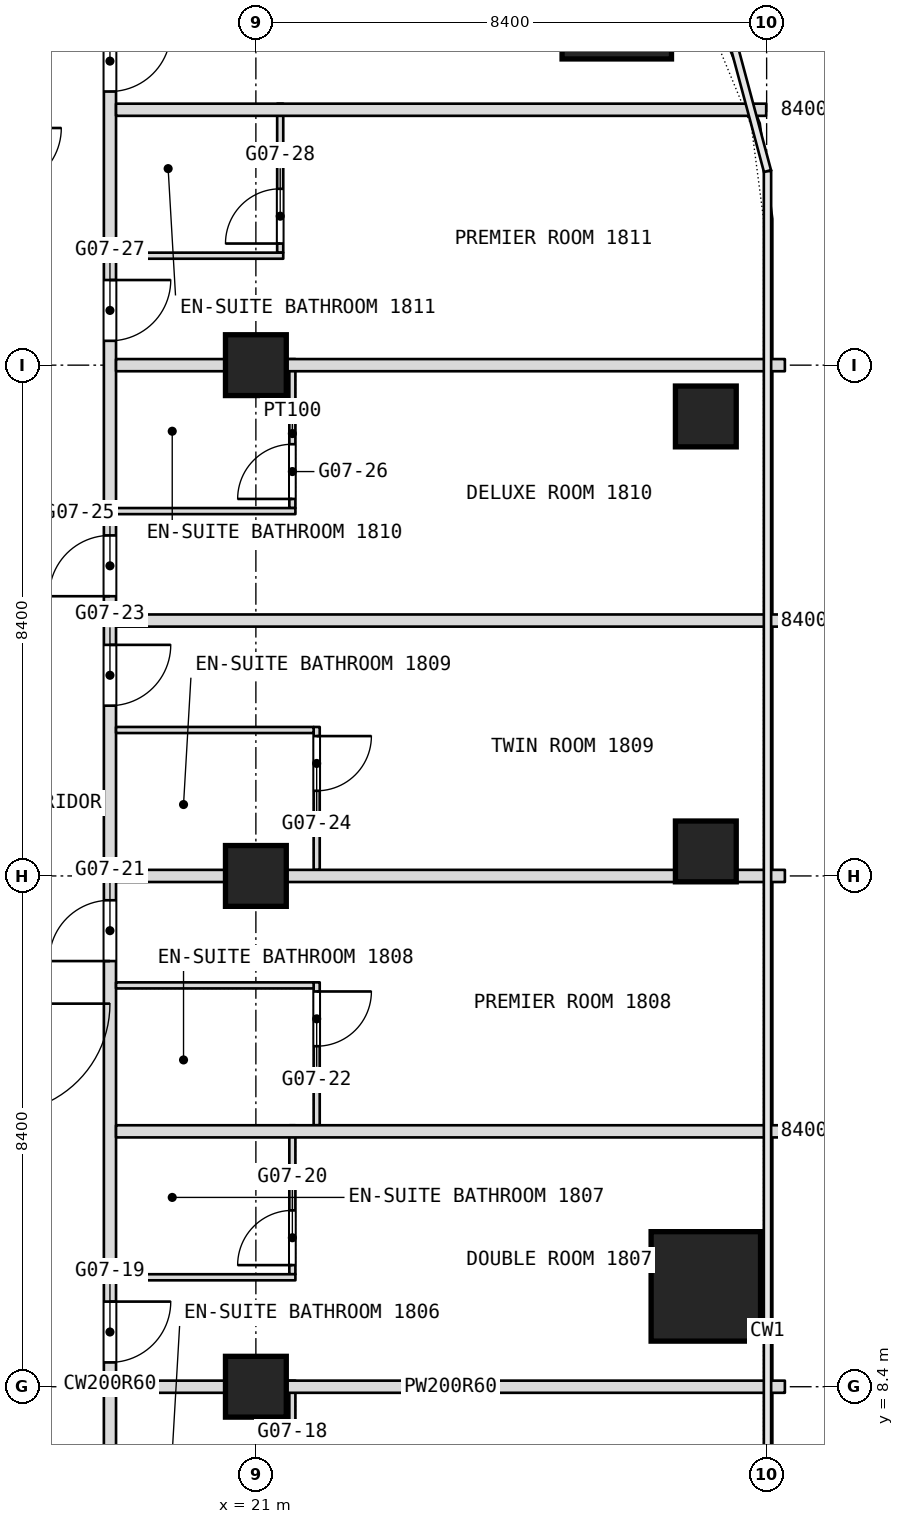
"""IFC4 building model, lengths in metres.
Left out: names, types, materials, properties, quantities, classifications, styles, units other than length and angle.
Written with IfcOpenShell. Run it as: python <this file> out.ifc"""

import sys

from ifc_helpers import new_model, si_unit, direction, frame, frame_2d, origin, origin_2d, place, context, subcontext, project, spatial, rectangle, extrude, element, fill, save


model = new_model("IFC4")
c1 = context("Model", 3, precision=1e-05, world=origin(), true_north=direction((0.0, 1.0)))
c2 = subcontext(c1, "Body", "Model", "MODEL_VIEW")
j1 = project(units=[si_unit("LENGTHUNIT", "METRE"), si_unit("PLANEANGLEUNIT", "RADIAN")], contexts=[c1])
p1 = place(None, origin())
s1 = spatial("IfcSite", under=j1, at=p1, CompositionType="ELEMENT")
p2 = place(p1, origin())
s2 = spatial("IfcBuilding", under=s1, at=p2, CompositionType="ELEMENT")
p3 = place(p2, frame((0.0, 0.0, 79.7)))
s3 = spatial("IfcBuildingStorey", under=s2, at=p3, CompositionType="ELEMENT", Elevation=79.7)
for number, where, z_axis, x_axis in (
    (1, (28.4, 10.05, 0.0), (0.0, 0.0, 1.0), (1.0, 0.0, 0.0)),
    (2, (26.936, 31.135, 0.0), (0.0, 0.0, 1.0), (1.0, 0.0, 0.0)),
):
    element("IfcColumn", number, at=place(p3, frame(where, z_axis=z_axis, x_axis=x_axis)), inside=s3, PredefinedType="COLUMN", context=c2, shape_type="SweptSolid", body=[
        extrude(rectangle(XDim=1.8, YDim=1.8, at=origin_2d()), origin(), (0.0, 0.0, 1.0), 3.6),
    ])
for number, where, z_axis, x_axis in (
    (3, (21.0, 8.4, 0.0), (0.0, 0.0, 1.0), (1.0, 0.0, 0.0)),
    (4, (21.0, 16.8, 0.0), (0.0, 0.0, 1.0), (1.0, 0.0, 0.0)),
    (5, (21.0, 25.2, 0.0), (0.0, 0.0, 1.0), (1.0, 0.0, 0.0)),
    (6, (28.4, 24.356, 0.0), (0.0, 0.0, 1.0), (1.0, 0.0, 0.0)),
    (7, (28.4, 17.203, 0.0), (0.0, 0.0, 1.0), (1.0, 0.0, 0.0)),
):
    element("IfcColumn", number, at=place(p3, frame(where, z_axis=z_axis, x_axis=x_axis)), inside=s3, PredefinedType="COLUMN", context=c2, shape_type="SweptSolid", body=[
        extrude(rectangle(XDim=1.0, YDim=1.0, at=origin_2d()), origin(), (0.0, 0.0, 1.0), 3.6),
    ])
p4 = place(p3, frame((22.0, 12.7, 0.0), z_axis=(0.0, 0.0, 1.0), x_axis=(0.0, 1.0, 0.0)))
e8 = element("IfcWall", 8, at=p4, inside=s3, PredefinedType="PARTITIONING", context=c2, shape_type="SweptSolid", body=[
    extrude(rectangle(XDim=2.35, YDim=0.1, at=frame_2d((1.175, 0.0))), origin(), (0.0, 0.0, 1.0), 3.34),
])
p5 = place(p4, frame((1.3, 0.0, 0.0)))
e9 = element("IfcOpeningElement", 9, at=p5, cuts=e8, PredefinedType="OPENING", context=c2, shape_type="SweptSolid", body=[
    extrude(rectangle(XDim=0.9, YDim=2.1, at=frame_2d((0.45, 1.05))), frame((0.0, 0.05, 0.0), z_axis=(0.0, -1.0, 0.0), x_axis=(1.0, 0.0, 0.0)), (0.0, 0.0, 1.0), 0.1),
])
p6 = place(p3, frame((22.0, 16.9, 0.0), z_axis=(0.0, 0.0, 1.0), x_axis=(0.0, 1.0, 0.0)))
e10 = element("IfcWall", 10, at=p6, inside=s3, PredefinedType="PARTITIONING", context=c2, shape_type="SweptSolid", body=[
    extrude(rectangle(XDim=2.35, YDim=0.1, at=frame_2d((1.175, 0.0))), origin(), (0.0, 0.0, 1.0), 3.34),
])
p7 = place(p6, frame((1.3, 0.0, 0.0)))
e11 = element("IfcOpeningElement", 11, at=p7, cuts=e10, PredefinedType="OPENING", context=c2, shape_type="SweptSolid", body=[
    extrude(rectangle(XDim=0.9, YDim=2.1, at=frame_2d((0.45, 1.05))), frame((0.0, 0.05, 0.0), z_axis=(0.0, -1.0, 0.0), x_axis=(1.0, 0.0, 0.0)), (0.0, 0.0, 1.0), 0.1),
])
p8 = place(p3, frame((21.6, 6.05, 0.0), z_axis=(0.0, 0.0, 1.0), x_axis=(0.0, 1.0, 0.0)))
e12 = element("IfcWall", 12, at=p8, inside=s3, PredefinedType="PARTITIONING", context=c2, shape_type="SweptSolid", body=[
    extrude(rectangle(XDim=2.45, YDim=0.1, at=frame_2d((1.225, 0.0))), origin(), (0.0, 0.0, 1.0), 3.34),
])
p9 = place(p8, frame((0.15, 0.0, 0.0)))
e13 = element("IfcOpeningElement", 13, at=p9, cuts=e12, PredefinedType="OPENING", context=c2, shape_type="SweptSolid", body=[
    extrude(rectangle(XDim=0.9, YDim=2.1, at=frame_2d((0.45, 1.05))), frame((0.0, 0.05, 0.0), z_axis=(0.0, -1.0, 0.0), x_axis=(1.0, 0.0, 0.0)), (0.0, 0.0, 1.0), 0.1),
])
p10 = place(p3, frame((21.6, 10.25, 0.0), z_axis=(0.0, 0.0, 1.0), x_axis=(0.0, 1.0, 0.0)))
e14 = element("IfcWall", 14, at=p10, inside=s3, PredefinedType="PARTITIONING", context=c2, shape_type="SweptSolid", body=[
    extrude(rectangle(XDim=2.45, YDim=0.1, at=frame_2d((1.225, 0.0))), origin(), (0.0, 0.0, 1.0), 3.34),
])
p11 = place(p10, frame((0.15, 0.0, 0.0)))
e15 = element("IfcOpeningElement", 15, at=p11, cuts=e14, PredefinedType="OPENING", context=c2, shape_type="SweptSolid", body=[
    extrude(rectangle(XDim=0.9, YDim=2.1, at=frame_2d((0.45, 1.05))), frame((0.0, 0.05, 0.0), z_axis=(0.0, -1.0, 0.0), x_axis=(1.0, 0.0, 0.0)), (0.0, 0.0, 1.0), 0.1),
])
p12 = place(p3, frame((21.6, 22.85, 0.0), z_axis=(0.0, 0.0, 1.0), x_axis=(0.0, 1.0, 0.0)))
e16 = element("IfcWall", 16, at=p12, inside=s3, PredefinedType="PARTITIONING", context=c2, shape_type="SweptSolid", body=[
    extrude(rectangle(XDim=2.45, YDim=0.1, at=frame_2d((1.225, 0.0))), origin(), (0.0, 0.0, 1.0), 3.34),
])
p13 = place(p12, frame((0.15, 0.0, 0.0)))
e17 = element("IfcOpeningElement", 17, at=p13, cuts=e16, PredefinedType="OPENING", context=c2, shape_type="SweptSolid", body=[
    extrude(rectangle(XDim=0.9, YDim=2.1, at=frame_2d((0.45, 1.05))), frame((0.0, 0.05, 0.0), z_axis=(0.0, -1.0, 0.0), x_axis=(1.0, 0.0, 0.0)), (0.0, 0.0, 1.0), 0.1),
])
p14 = place(p3, frame((21.4, 27.05, 0.0), z_axis=(0.0, 0.0, 1.0), x_axis=(0.0, 1.0, 0.0)))
e18 = element("IfcWall", 18, at=p14, inside=s3, PredefinedType="PARTITIONING", context=c2, shape_type="SweptSolid", body=[
    extrude(rectangle(XDim=2.45, YDim=0.1, at=frame_2d((1.225, 0.0))), origin(), (0.0, 0.0, 1.0), 3.34),
])
p15 = place(p14, frame((0.15, 0.0, 0.0)))
e19 = element("IfcOpeningElement", 19, at=p15, cuts=e18, PredefinedType="OPENING", context=c2, shape_type="SweptSolid", body=[
    extrude(rectangle(XDim=0.9, YDim=2.1, at=frame_2d((0.45, 1.05))), frame((0.0, 0.05, 0.0), z_axis=(0.0, -1.0, 0.0), x_axis=(1.0, 0.0, 0.0)), (0.0, 0.0, 1.0), 0.1),
])
p16 = place(p3, frame((18.6, -16.665, 0.0), z_axis=(0.0, 0.0, 1.0), x_axis=(0.0, 1.0, 0.0)))
e20 = element("IfcWall", 20, at=p16, inside=s3, PredefinedType="PARTITIONING", context=c2, shape_type="SweptSolid", body=[
    extrude(rectangle(XDim=50.205, YDim=0.2, at=frame_2d((25.103, 0.0))), origin(), (0.0, 0.0, 1.0), 3.34),
])
p17 = place(p16, frame((2.991, 0.0, 0.0)))
e21 = element("IfcOpeningElement", 21, at=p17, cuts=e20, PredefinedType="OPENING", context=c2, shape_type="SweptSolid", body=[
    extrude(rectangle(XDim=1.0, YDim=2.1, at=frame_2d((0.5, 1.05))), frame((0.0, 0.1, 0.0), z_axis=(0.0, -1.0, 0.0), x_axis=(1.0, 0.0, 0.0)), (0.0, 0.0, 1.0), 0.2),
])
p18 = place(p16, frame((4.574, 0.0, 0.0)))
e22 = element("IfcOpeningElement", 22, at=p18, cuts=e20, PredefinedType="OPENING", context=c2, shape_type="SweptSolid", body=[
    extrude(rectangle(XDim=1.0, YDim=2.1, at=frame_2d((0.5, 1.05))), frame((0.0, 0.1, 0.0), z_axis=(0.0, -1.0, 0.0), x_axis=(1.0, 0.0, 0.0)), (0.0, 0.0, 1.0), 0.2),
])
p19 = place(p16, frame((8.665, 0.0, 0.0)))
e23 = element("IfcOpeningElement", 23, at=p19, cuts=e20, PredefinedType="OPENING", context=c2, shape_type="SweptSolid", body=[
    extrude(rectangle(XDim=1.0, YDim=2.1, at=frame_2d((0.5, 1.05))), frame((0.0, 0.1, 0.0), z_axis=(0.0, -1.0, 0.0), x_axis=(1.0, 0.0, 0.0)), (0.0, 0.0, 1.0), 0.2),
])
p20 = place(p16, frame((15.265, 0.0, 0.0)))
e24 = element("IfcOpeningElement", 24, at=p20, cuts=e20, PredefinedType="OPENING", context=c2, shape_type="SweptSolid", body=[
    extrude(rectangle(XDim=1.0, YDim=2.1, at=frame_2d((0.5, 1.05))), frame((0.0, 0.1, 0.0), z_axis=(0.0, -1.0, 0.0), x_axis=(1.0, 0.0, 0.0)), (0.0, 0.0, 1.0), 0.2),
])
p21 = place(p16, frame((19.465, 0.0, 0.0)))
e25 = element("IfcOpeningElement", 25, at=p21, cuts=e20, PredefinedType="OPENING", context=c2, shape_type="SweptSolid", body=[
    extrude(rectangle(XDim=1.0, YDim=2.1, at=frame_2d((0.5, 1.05))), frame((0.0, 0.1, 0.0), z_axis=(0.0, -1.0, 0.0), x_axis=(1.0, 0.0, 0.0)), (0.0, 0.0, 1.0), 0.2),
])
p22 = place(p16, frame((21.265, 0.0, 0.0)))
e26 = element("IfcOpeningElement", 26, at=p22, cuts=e20, PredefinedType="OPENING", context=c2, shape_type="SweptSolid", body=[
    extrude(rectangle(XDim=1.0, YDim=2.1, at=frame_2d((0.5, 1.05))), frame((0.0, 0.1, 0.0), z_axis=(0.0, -1.0, 0.0), x_axis=(1.0, 0.0, 0.0)), (0.0, 0.0, 1.0), 0.2),
])
p23 = place(p16, frame((25.465, 0.0, 0.0)))
e27 = element("IfcOpeningElement", 27, at=p23, cuts=e20, PredefinedType="OPENING", context=c2, shape_type="SweptSolid", body=[
    extrude(rectangle(XDim=1.0, YDim=2.1, at=frame_2d((0.5, 1.05))), frame((0.0, 0.1, 0.0), z_axis=(0.0, -1.0, 0.0), x_axis=(1.0, 0.0, 0.0)), (0.0, 0.0, 1.0), 0.2),
])
p24 = place(p16, frame((32.065, 0.0, 0.0)))
e28 = element("IfcOpeningElement", 28, at=p24, cuts=e20, PredefinedType="OPENING", context=c2, shape_type="SweptSolid", body=[
    extrude(rectangle(XDim=1.0, YDim=2.1, at=frame_2d((0.5, 1.05))), frame((0.0, 0.1, 0.0), z_axis=(0.0, -1.0, 0.0), x_axis=(1.0, 0.0, 0.0)), (0.0, 0.0, 1.0), 0.2),
])
p25 = place(p16, frame((36.265, 0.0, 0.0)))
e29 = element("IfcOpeningElement", 29, at=p25, cuts=e20, PredefinedType="OPENING", context=c2, shape_type="SweptSolid", body=[
    extrude(rectangle(XDim=1.0, YDim=2.1, at=frame_2d((0.5, 1.05))), frame((0.0, 0.1, 0.0), z_axis=(0.0, -1.0, 0.0), x_axis=(1.0, 0.0, 0.0)), (0.0, 0.0, 1.0), 0.2),
])
p26 = place(p16, frame((38.065, 0.0, 0.0)))
e30 = element("IfcOpeningElement", 30, at=p26, cuts=e20, PredefinedType="OPENING", context=c2, shape_type="SweptSolid", body=[
    extrude(rectangle(XDim=1.0, YDim=2.1, at=frame_2d((0.5, 1.05))), frame((0.0, 0.1, 0.0), z_axis=(0.0, -1.0, 0.0), x_axis=(1.0, 0.0, 0.0)), (0.0, 0.0, 1.0), 0.2),
])
p27 = place(p16, frame((42.265, 0.0, 0.0)))
e31 = element("IfcOpeningElement", 31, at=p27, cuts=e20, PredefinedType="OPENING", context=c2, shape_type="SweptSolid", body=[
    extrude(rectangle(XDim=1.0, YDim=2.1, at=frame_2d((0.5, 1.05))), frame((0.0, 0.1, 0.0), z_axis=(0.0, -1.0, 0.0), x_axis=(1.0, 0.0, 0.0)), (0.0, 0.0, 1.0), 0.2),
])
p28 = place(p16, frame((46.365, 0.0, 0.0)))
e32 = element("IfcOpeningElement", 32, at=p28, cuts=e20, PredefinedType="OPENING", context=c2, shape_type="SweptSolid", body=[
    extrude(rectangle(XDim=1.0, YDim=2.1, at=frame_2d((0.5, 1.05))), frame((0.0, 0.1, 0.0), z_axis=(0.0, -1.0, 0.0), x_axis=(1.0, 0.0, 0.0)), (0.0, 0.0, 1.0), 0.2),
])
p29 = place(p3, frame((18.7, 8.4, 0.0), z_axis=(0.0, 0.0, 1.0), x_axis=(1.0, 0.0, 0.0)))
e33 = element("IfcWall", 33, at=p29, inside=s3, PredefinedType="PARTITIONING", context=c2, shape_type="SweptSolid", body=[
    extrude(rectangle(XDim=11.0, YDim=0.2, at=frame_2d((5.5, 0.0))), origin(), (0.0, 0.0, 1.0), 2.84),
])
p30 = place(p3, frame((18.7, 10.2, 0.0), z_axis=(0.0, 0.0, 1.0), x_axis=(1.0, 0.0, 0.0)))
e34 = element("IfcWall", 34, at=p30, inside=s3, PredefinedType="PARTITIONING", context=c2, shape_type="SweptSolid", body=[
    extrude(rectangle(XDim=2.95, YDim=0.1, at=frame_2d((1.475, 0.0))), origin(), (0.0, 0.0, 1.0), 3.34),
])
p31 = place(p3, frame((18.7, 12.6, 0.0), z_axis=(0.0, 0.0, 1.0), x_axis=(1.0, 0.0, 0.0)))
e35 = element("IfcWall", 35, at=p31, inside=s3, PredefinedType="PARTITIONING", context=c2, shape_type="SweptSolid", body=[
    extrude(rectangle(XDim=11.0, YDim=0.2, at=frame_2d((5.5, 0.0))), origin(), (0.0, 0.0, 1.0), 3.34),
])
p32 = place(p3, frame((18.7, 15.0, 0.0), z_axis=(0.0, 0.0, 1.0), x_axis=(1.0, 0.0, 0.0)))
e36 = element("IfcWall", 36, at=p32, inside=s3, PredefinedType="PARTITIONING", context=c2, shape_type="SweptSolid", body=[
    extrude(rectangle(XDim=3.25, YDim=0.1, at=frame_2d((1.625, 0.0))), origin(), (0.0, 0.0, 1.0), 3.34),
])
p33 = place(p3, frame((18.7, 16.8, 0.0), z_axis=(0.0, 0.0, 1.0), x_axis=(1.0, 0.0, 0.0)))
e37 = element("IfcWall", 37, at=p33, inside=s3, PredefinedType="PARTITIONING", context=c2, shape_type="SweptSolid", body=[
    extrude(rectangle(XDim=11.0, YDim=0.2, at=frame_2d((5.5, 0.0))), origin(), (0.0, 0.0, 1.0), 2.84),
])
p34 = place(p3, frame((18.7, 19.2, 0.0), z_axis=(0.0, 0.0, 1.0), x_axis=(1.0, 0.0, 0.0)))
e38 = element("IfcWall", 38, at=p34, inside=s3, PredefinedType="PARTITIONING", context=c2, shape_type="SweptSolid", body=[
    extrude(rectangle(XDim=3.25, YDim=0.1, at=frame_2d((1.625, 0.0))), origin(), (0.0, 0.0, 1.0), 3.34),
])
p35 = place(p3, frame((18.7, 21.0, 0.0), z_axis=(0.0, 0.0, 1.0), x_axis=(1.0, 0.0, 0.0)))
e39 = element("IfcWall", 39, at=p35, inside=s3, PredefinedType="PARTITIONING", context=c2, shape_type="SweptSolid", body=[
    extrude(rectangle(XDim=11.0, YDim=0.2, at=frame_2d((5.5, 0.0))), origin(), (0.0, 0.0, 1.0), 3.34),
])
p36 = place(p3, frame((18.7, 22.8, 0.0), z_axis=(0.0, 0.0, 1.0), x_axis=(1.0, 0.0, 0.0)))
e40 = element("IfcWall", 40, at=p36, inside=s3, PredefinedType="PARTITIONING", context=c2, shape_type="SweptSolid", body=[
    extrude(rectangle(XDim=2.95, YDim=0.1, at=frame_2d((1.475, 0.0))), origin(), (0.0, 0.0, 1.0), 3.34),
])
p37 = place(p3, frame((18.7, 25.2, 0.0), z_axis=(0.0, 0.0, 1.0), x_axis=(1.0, 0.0, 0.0)))
e41 = element("IfcWall", 41, at=p37, inside=s3, PredefinedType="PARTITIONING", context=c2, shape_type="SweptSolid", body=[
    extrude(rectangle(XDim=11.0, YDim=0.2, at=frame_2d((5.5, 0.0))), origin(), (0.0, 0.0, 1.0), 2.84),
])
p38 = place(p3, frame((18.7, 27.0, 0.0), z_axis=(0.0, 0.0, 1.0), x_axis=(1.0, 0.0, 0.0)))
e42 = element("IfcWall", 42, at=p38, inside=s3, PredefinedType="PARTITIONING", context=c2, shape_type="SweptSolid", body=[
    extrude(rectangle(XDim=2.75, YDim=0.1, at=frame_2d((1.375, 0.0))), origin(), (0.0, 0.0, 1.0), 3.34),
])
p39 = place(p3, frame((18.7, 29.4, 0.0), z_axis=(0.0, 0.0, 1.0), x_axis=(1.0, 0.0, 0.0)))
e43 = element("IfcWall", 43, at=p39, inside=s3, PredefinedType="PARTITIONING", context=c2, shape_type="SweptSolid", body=[
    extrude(rectangle(XDim=10.693, YDim=0.2, at=frame_2d((5.347, 0.0))), origin(), (0.0, 0.0, 1.0), 3.34),
])
p40 = place(p5, origin())
e44 = element("IfcDoor", 44, at=p40, inside=s3, OperationType="SINGLE_SWING_RIGHT", PredefinedType="DOOR", context=c2, shape_type="SweptSolid", body=[
    extrude(rectangle(XDim=0.9, YDim=2.1, at=frame_2d((0.45, 1.05))), frame((0.0, 0.025, 0.0), z_axis=(0.0, -1.0, 0.0), x_axis=(1.0, 0.0, 0.0)), (0.0, 0.0, 1.0), 0.05),
])
fill(e9, e44)
p41 = place(p7, origin())
e45 = element("IfcDoor", 45, at=p41, inside=s3, OperationType="SINGLE_SWING_RIGHT", PredefinedType="DOOR", context=c2, shape_type="SweptSolid", body=[
    extrude(rectangle(XDim=0.9, YDim=2.1, at=frame_2d((0.45, 1.05))), frame((0.0, 0.025, 0.0), z_axis=(0.0, -1.0, 0.0), x_axis=(1.0, 0.0, 0.0)), (0.0, 0.0, 1.0), 0.05),
])
fill(e11, e45)
p42 = place(p11, origin())
e46 = element("IfcDoor", 46, at=p42, inside=s3, OperationType="SINGLE_SWING_LEFT", PredefinedType="DOOR", context=c2, shape_type="SweptSolid", body=[
    extrude(rectangle(XDim=0.9, YDim=2.1, at=frame_2d((0.45, 1.05))), frame((0.0, 0.025, 0.0), z_axis=(0.0, -1.0, 0.0), x_axis=(1.0, 0.0, 0.0)), (0.0, 0.0, 1.0), 0.05),
])
fill(e15, e46)
p43 = place(p13, origin())
e47 = element("IfcDoor", 47, at=p43, inside=s3, OperationType="SINGLE_SWING_LEFT", PredefinedType="DOOR", context=c2, shape_type="SweptSolid", body=[
    extrude(rectangle(XDim=0.9, YDim=2.1, at=frame_2d((0.45, 1.05))), frame((0.0, 0.025, 0.0), z_axis=(0.0, -1.0, 0.0), x_axis=(1.0, 0.0, 0.0)), (0.0, 0.0, 1.0), 0.05),
])
fill(e17, e47)
p44 = place(p15, origin())
e48 = element("IfcDoor", 48, at=p44, inside=s3, OperationType="SINGLE_SWING_LEFT", PredefinedType="DOOR", context=c2, shape_type="SweptSolid", body=[
    extrude(rectangle(XDim=0.9, YDim=2.1, at=frame_2d((0.45, 1.05))), frame((0.0, 0.025, 0.0), z_axis=(0.0, -1.0, 0.0), x_axis=(1.0, 0.0, 0.0)), (0.0, 0.0, 1.0), 0.05),
])
fill(e19, e48)
p45 = place(p23, origin())
e49 = element("IfcDoor", 49, at=p45, inside=s3, OperationType="SINGLE_SWING_LEFT", PredefinedType="DOOR", context=c2, shape_type="SweptSolid", body=[
    extrude(rectangle(XDim=1.0, YDim=2.1, at=frame_2d((0.5, 1.05))), frame((0.0, 0.025, 0.0), z_axis=(0.0, -1.0, 0.0), x_axis=(1.0, 0.0, 0.0)), (0.0, 0.0, 1.0), 0.05),
])
fill(e27, e49)
p46 = place(p24, origin())
e50 = element("IfcDoor", 50, at=p46, inside=s3, OperationType="SINGLE_SWING_LEFT", PredefinedType="DOOR", context=c2, shape_type="SweptSolid", body=[
    extrude(rectangle(XDim=1.0, YDim=2.1, at=frame_2d((0.5, 1.05))), frame((0.0, 0.025, 0.0), z_axis=(0.0, -1.0, 0.0), x_axis=(1.0, 0.0, 0.0)), (0.0, 0.0, 1.0), 0.05),
])
fill(e28, e50)
p47 = place(p25, origin())
e51 = element("IfcDoor", 51, at=p47, inside=s3, OperationType="SINGLE_SWING_LEFT", PredefinedType="DOOR", context=c2, shape_type="SweptSolid", body=[
    extrude(rectangle(XDim=1.0, YDim=2.1, at=frame_2d((0.5, 1.05))), frame((0.0, 0.025, 0.0), z_axis=(0.0, -1.0, 0.0), x_axis=(1.0, 0.0, 0.0)), (0.0, 0.0, 1.0), 0.05),
])
fill(e29, e51)
p48 = place(p26, origin())
e52 = element("IfcDoor", 52, at=p48, inside=s3, OperationType="SINGLE_SWING_LEFT", PredefinedType="DOOR", context=c2, shape_type="SweptSolid", body=[
    extrude(rectangle(XDim=1.0, YDim=2.1, at=frame_2d((0.5, 1.05))), frame((0.0, 0.025, 0.0), z_axis=(0.0, -1.0, 0.0), x_axis=(1.0, 0.0, 0.0)), (0.0, 0.0, 1.0), 0.05),
])
fill(e30, e52)
p49 = place(p27, origin())
e53 = element("IfcDoor", 53, at=p49, inside=s3, OperationType="SINGLE_SWING_LEFT", PredefinedType="DOOR", context=c2, shape_type="SweptSolid", body=[
    extrude(rectangle(XDim=1.0, YDim=2.1, at=frame_2d((0.5, 1.05))), frame((0.0, 0.025, 0.0), z_axis=(0.0, -1.0, 0.0), x_axis=(1.0, 0.0, 0.0)), (0.0, 0.0, 1.0), 0.05),
])
fill(e31, e53)
p50 = place(p28, origin())
e54 = element("IfcDoor", 54, at=p50, inside=s3, OperationType="SINGLE_SWING_LEFT", PredefinedType="DOOR", context=c2, shape_type="SweptSolid", body=[
    extrude(rectangle(XDim=1.0, YDim=2.1, at=frame_2d((0.5, 1.05))), frame((0.0, 0.025, 0.0), z_axis=(0.0, -1.0, 0.0), x_axis=(1.0, 0.0, 0.0)), (0.0, 0.0, 1.0), 0.05),
])
fill(e32, e54)
save(model, sys.argv[1])
